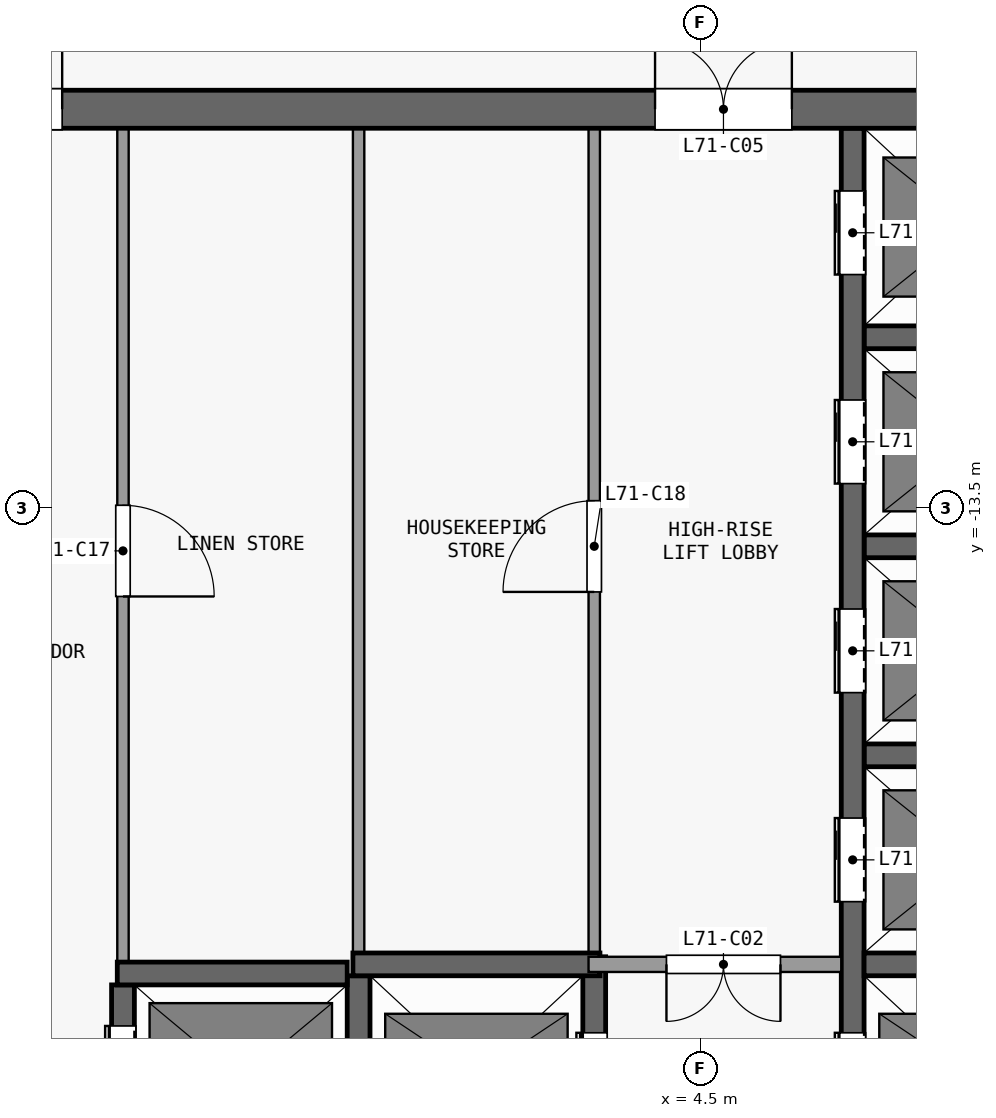
"""IFC4 building model, lengths in metres.
Left out: names, types, materials, properties, quantities, classifications, styles, units other than length and angle.
Written with IfcOpenShell. Run it as: python <this file> out.ifc"""

import sys

from ifc_helpers import new_model, si_unit, direction, frame, frame_2d, origin, place, context, subcontext, project, spatial, rectangle, extrude, element, fill, save


model = new_model("IFC4")
c1 = context("Model", 3, precision=1e-05, world=origin(), true_north=direction((0.0, 1.0)))
c2 = subcontext(c1, "Body", "Model", "MODEL_VIEW")
j1 = project(units=[si_unit("LENGTHUNIT", "METRE"), si_unit("PLANEANGLEUNIT", "RADIAN")], contexts=[c1])
p1 = place(None, origin())
s1 = spatial("IfcSite", under=j1, at=p1, CompositionType="ELEMENT")
p2 = place(p1, origin())
s2 = spatial("IfcBuilding", under=s1, at=p2, CompositionType="ELEMENT")
p3 = place(p2, frame((0.0, 0.0, 280.7)))
s3 = spatial("IfcBuildingStorey", under=s2, at=p3, CompositionType="ELEMENT", Elevation=280.7)
p4 = place(p3, frame((-13.1, -8.25, 0.0), z_axis=(0.0, 0.0, 1.0), x_axis=(1.0, 0.0, 0.0)))
e1 = element("IfcWall", 1, at=p4, inside=s3, PredefinedType="SHEAR", context=c2, shape_type="SweptSolid", body=[
    extrude(rectangle(XDim=26.2, YDim=0.5, at=frame_2d((13.1, 0.0))), origin(), (0.0, 0.0, 1.0), 3.3),
])
p5 = place(p4, frame((7.4, 0.0, 0.0)))
e2 = element("IfcOpeningElement", 2, at=p5, cuts=e1, PredefinedType="OPENING", context=c2, shape_type="SweptSolid", body=[
    extrude(rectangle(XDim=1.8, YDim=2.1, at=frame_2d((0.9, 1.05))), frame((0.0, 0.26, 0.0), z_axis=(0.0, -1.0, 0.0), x_axis=(1.0, 0.0, 0.0)), (0.0, 0.0, 1.0), 0.52),
])
p6 = place(p4, frame((17.0, 0.0, 0.0)))
e3 = element("IfcOpeningElement", 3, at=p6, cuts=e1, PredefinedType="OPENING", context=c2, shape_type="SweptSolid", body=[
    extrude(rectangle(XDim=1.8, YDim=2.1, at=frame_2d((0.9, 1.05))), frame((0.0, 0.26, 0.0), z_axis=(0.0, -1.0, 0.0), x_axis=(1.0, 0.0, 0.0)), (0.0, 0.0, 1.0), 0.52),
])
p7 = place(p4, frame((2.325, 0.0, 0.0)))
e4 = element("IfcOpeningElement", 4, at=p7, cuts=e1, PredefinedType="OPENING", context=c2, shape_type="SweptSolid", body=[
    extrude(rectangle(XDim=0.9, YDim=2.1, at=frame_2d((0.45, 1.05))), frame((0.0, 0.26, 0.0), z_axis=(0.0, -1.0, 0.0), x_axis=(1.0, 0.0, 0.0)), (0.0, 0.0, 1.0), 0.52),
])
p8 = place(p4, frame((22.975, 0.0, 0.0)))
e5 = element("IfcOpeningElement", 5, at=p8, cuts=e1, PredefinedType="OPENING", context=c2, shape_type="SweptSolid", body=[
    extrude(rectangle(XDim=0.9, YDim=2.1, at=frame_2d((0.45, 1.05))), frame((0.0, 0.26, 0.0), z_axis=(0.0, -1.0, 0.0), x_axis=(1.0, 0.0, 0.0)), (0.0, 0.0, 1.0), 0.52),
])
p9 = place(p3, frame((-3.175, -19.62, 0.0), z_axis=(0.0, 0.0, 1.0), x_axis=(1.0, 0.0, 0.0)))
e6 = element("IfcWall", 6, at=p9, inside=s3, PredefinedType="SHEAR", context=c2, shape_type="SweptSolid", body=[
    extrude(rectangle(XDim=3.025, YDim=0.3, at=frame_2d((1.513, 0.0))), origin(), (0.0, 0.0, 1.0), 3.3),
])
p10 = place(p3, frame((-0.075, -19.5, 0.0), z_axis=(0.0, 0.0, 1.0), x_axis=(1.0, 0.0, 0.0)))
e7 = element("IfcWall", 7, at=p10, inside=s3, PredefinedType="SHEAR", context=c2, shape_type="SweptSolid", body=[
    extrude(rectangle(XDim=3.25, YDim=0.3, at=frame_2d((1.625, 0.0))), origin(), (0.0, 0.0, 1.0), 3.3),
])
p11 = place(p3, frame((6.35, -19.5, 0.0), z_axis=(0.0, 0.0, 1.0), x_axis=(-1.0, 0.0, 0.0)))
e8 = element("IfcWall", 8, at=p11, inside=s3, PredefinedType="PARTITIONING", context=c2, shape_type="SweptSolid", body=[
    extrude(rectangle(XDim=3.325, YDim=0.2, at=frame_2d((1.663, 0.0))), origin(), (0.0, 0.0, 1.0), 3.3),
])
p12 = place(p11, frame((0.8, 0.0, 0.0)))
e9 = element("IfcOpeningElement", 9, at=p12, cuts=e8, PredefinedType="OPENING", context=c2, shape_type="SweptSolid", body=[
    extrude(rectangle(XDim=1.5, YDim=2.1, at=frame_2d((0.75, 1.05))), frame((0.0, 0.11, 0.0), z_axis=(0.0, -1.0, 0.0), x_axis=(1.0, 0.0, 0.0)), (0.0, 0.0, 1.0), 0.22),
])
for number, where, z_axis, x_axis in (
    (10, (6.65, -19.5, 0.0), (0.0, 0.0, 1.0), (1.0, 0.0, 0.0)),
    (11, (6.65, -16.75, 0.0), (0.0, 0.0, 1.0), (1.0, 0.0, 0.0)),
    (12, (6.65, -14.0, 0.0), (0.0, 0.0, 1.0), (1.0, 0.0, 0.0)),
    (13, (6.65, -11.25, 0.0), (0.0, 0.0, 1.0), (1.0, 0.0, 0.0)),
):
    element("IfcWall", number, at=place(p3, frame(where, z_axis=z_axis, x_axis=x_axis)), inside=s3, PredefinedType="SHEAR", context=c2, shape_type="SweptSolid", body=[
        extrude(rectangle(XDim=2.8, YDim=0.3, at=frame_2d((1.4, 0.0))), origin(), (0.0, 0.0, 1.0), 3.3),
    ])
p13 = place(p3, frame((-3.1, -22.25, 0.0), z_axis=(0.0, 0.0, 1.0), x_axis=(0.0, 1.0, 0.0)))
e14 = element("IfcWall", 14, at=p13, inside=s3, PredefinedType="SHEAR", context=c2, shape_type="SweptSolid", body=[
    extrude(rectangle(XDim=2.48, YDim=0.3, at=frame_2d((1.24, 0.0))), origin(), (0.0, 0.0, 1.0), 3.3),
])
p14 = place(p13, frame((0.54, 0.0, 0.0)))
e15 = element("IfcOpeningElement", 15, at=p14, cuts=e14, PredefinedType="OPENING", context=c2, shape_type="SweptSolid", body=[
    extrude(rectangle(XDim=1.4, YDim=2.1, at=frame_2d((0.7, 1.05))), frame((0.0, 0.16, 0.0), z_axis=(0.0, -1.0, 0.0), x_axis=(1.0, 0.0, 0.0)), (0.0, 0.0, 1.0), 0.32),
])
p15 = place(p3, frame((-3.1, -8.5, 0.0), z_axis=(0.0, 0.0, 1.0), x_axis=(0.0, -1.0, 0.0)))
e16 = element("IfcWall", 16, at=p15, inside=s3, PredefinedType="PARTITIONING", context=c2, shape_type="SweptSolid", body=[
    extrude(rectangle(XDim=10.97, YDim=0.15, at=frame_2d((5.485, 0.0))), origin(), (0.0, 0.0, 1.0), 3.3),
])
p16 = place(p15, frame((4.96, 0.0, 0.0)))
e17 = element("IfcOpeningElement", 17, at=p16, cuts=e16, PredefinedType="OPENING", context=c2, shape_type="SweptSolid", body=[
    extrude(rectangle(XDim=1.2, YDim=2.1, at=frame_2d((0.6, 1.05))), frame((0.0, 0.085, 0.0), z_axis=(0.0, -1.0, 0.0), x_axis=(1.0, 0.0, 0.0)), (0.0, 0.0, 1.0), 0.17),
])
p17 = place(p3, frame((0.0, -22.25, 0.0), z_axis=(0.0, 0.0, 1.0), x_axis=(0.0, 1.0, 0.0)))
e18 = element("IfcWall", 18, at=p17, inside=s3, PredefinedType="SHEAR", context=c2, shape_type="SweptSolid", body=[
    extrude(rectangle(XDim=2.6, YDim=0.3, at=frame_2d((1.3, 0.0))), origin(), (0.0, 0.0, 1.0), 3.3),
])
p18 = place(p3, frame((0.0, -19.35, 0.0), z_axis=(0.0, 0.0, 1.0), x_axis=(0.0, 1.0, 0.0)))
e19 = element("IfcWall", 19, at=p18, inside=s3, PredefinedType="PARTITIONING", context=c2, shape_type="SweptSolid", body=[
    extrude(rectangle(XDim=10.85, YDim=0.15, at=frame_2d((5.425, 0.0))), origin(), (0.0, 0.0, 1.0), 3.3),
])
p19 = place(p3, frame((3.1, -22.25, 0.0), z_axis=(0.0, 0.0, 1.0), x_axis=(0.0, 1.0, 0.0)))
e20 = element("IfcWall", 20, at=p19, inside=s3, PredefinedType="SHEAR", context=c2, shape_type="SweptSolid", body=[
    extrude(rectangle(XDim=2.85, YDim=0.3, at=frame_2d((1.425, 0.0))), origin(), (0.0, 0.0, 1.0), 3.3),
])
p20 = place(p19, frame((0.75, 0.0, 0.0)))
e21 = element("IfcOpeningElement", 21, at=p20, cuts=e20, PredefinedType="OPENING", context=c2, shape_type="SweptSolid", body=[
    extrude(rectangle(XDim=1.1, YDim=2.1, at=frame_2d((0.55, 1.05))), frame((0.0, 0.16, 0.0), z_axis=(0.0, -1.0, 0.0), x_axis=(1.0, 0.0, 0.0)), (0.0, 0.0, 1.0), 0.32),
])
p21 = place(p3, frame((3.1, -19.4, 0.0), z_axis=(0.0, 0.0, 1.0), x_axis=(0.0, 1.0, 0.0)))
e22 = element("IfcWall", 22, at=p21, inside=s3, PredefinedType="PARTITIONING", context=c2, shape_type="SweptSolid", body=[
    extrude(rectangle(XDim=10.9, YDim=0.15, at=frame_2d((5.45, 0.0))), origin(), (0.0, 0.0, 1.0), 3.3),
])
p22 = place(p21, frame((4.8, 0.0, 0.0)))
e23 = element("IfcOpeningElement", 23, at=p22, cuts=e22, PredefinedType="OPENING", context=c2, shape_type="SweptSolid", body=[
    extrude(rectangle(XDim=1.2, YDim=2.1, at=frame_2d((0.6, 1.05))), frame((0.0, 0.085, 0.0), z_axis=(0.0, -1.0, 0.0), x_axis=(1.0, 0.0, 0.0)), (0.0, 0.0, 1.0), 0.17),
])
p23 = place(p3, frame((6.5, -22.55, 0.0), z_axis=(0.0, 0.0, 1.0), x_axis=(0.0, 1.0, 0.0)))
e24 = element("IfcWall", 24, at=p23, inside=s3, PredefinedType="SHEAR", context=c2, shape_type="SweptSolid", body=[
    extrude(rectangle(XDim=14.05, YDim=0.3, at=frame_2d((7.025, 0.0))), origin(), (0.0, 0.0, 1.0), 3.3),
])
p24 = place(p23, frame((1.05, 0.0, 0.0)))
e25 = element("IfcOpeningElement", 25, at=p24, cuts=e24, PredefinedType="OPENING", context=c2, shape_type="SweptSolid", body=[
    extrude(rectangle(XDim=1.1, YDim=2.1, at=frame_2d((0.55, 1.05))), frame((0.0, 0.16, 0.0), z_axis=(0.0, -1.0, 0.0), x_axis=(1.0, 0.0, 0.0)), (0.0, 0.0, 1.0), 0.32),
])
p25 = place(p23, frame((3.875, 0.0, 0.0)))
e26 = element("IfcOpeningElement", 26, at=p25, cuts=e24, PredefinedType="OPENING", context=c2, shape_type="SweptSolid", body=[
    extrude(rectangle(XDim=1.1, YDim=2.1, at=frame_2d((0.55, 1.05))), frame((0.0, 0.16, 0.0), z_axis=(0.0, -1.0, 0.0), x_axis=(1.0, 0.0, 0.0)), (0.0, 0.0, 1.0), 0.32),
])
p26 = place(p23, frame((6.625, 0.0, 0.0)))
e27 = element("IfcOpeningElement", 27, at=p26, cuts=e24, PredefinedType="OPENING", context=c2, shape_type="SweptSolid", body=[
    extrude(rectangle(XDim=1.1, YDim=2.1, at=frame_2d((0.55, 1.05))), frame((0.0, 0.16, 0.0), z_axis=(0.0, -1.0, 0.0), x_axis=(1.0, 0.0, 0.0)), (0.0, 0.0, 1.0), 0.32),
])
p27 = place(p23, frame((9.375, 0.0, 0.0)))
e28 = element("IfcOpeningElement", 28, at=p27, cuts=e24, PredefinedType="OPENING", context=c2, shape_type="SweptSolid", body=[
    extrude(rectangle(XDim=1.1, YDim=2.1, at=frame_2d((0.55, 1.05))), frame((0.0, 0.16, 0.0), z_axis=(0.0, -1.0, 0.0), x_axis=(1.0, 0.0, 0.0)), (0.0, 0.0, 1.0), 0.32),
])
p28 = place(p23, frame((12.125, 0.0, 0.0)))
e29 = element("IfcOpeningElement", 29, at=p28, cuts=e24, PredefinedType="OPENING", context=c2, shape_type="SweptSolid", body=[
    extrude(rectangle(XDim=1.1, YDim=2.1, at=frame_2d((0.55, 1.05))), frame((0.0, 0.16, 0.0), z_axis=(0.0, -1.0, 0.0), x_axis=(1.0, 0.0, 0.0)), (0.0, 0.0, 1.0), 0.32),
])
p29 = place(p20, origin())
e30 = element("IfcDoor", 30, at=p29, inside=s3, OperationType="DOUBLE_DOOR_SLIDING", PredefinedType="DOOR", context=c2, shape_type="SweptSolid", body=[
    extrude(rectangle(XDim=1.1, YDim=2.1, at=frame_2d((0.55, 1.05))), frame((0.0, 0.025, 0.0), z_axis=(0.0, -1.0, 0.0), x_axis=(1.0, 0.0, 0.0)), (0.0, 0.0, 1.0), 0.05),
])
fill(e21, e30)
p30 = place(p24, origin())
e31 = element("IfcDoor", 31, at=p30, inside=s3, OperationType="DOUBLE_DOOR_SLIDING", PredefinedType="DOOR", context=c2, shape_type="SweptSolid", body=[
    extrude(rectangle(XDim=1.1, YDim=2.1, at=frame_2d((0.55, 1.05))), frame((0.0, 0.025, 0.0), z_axis=(0.0, -1.0, 0.0), x_axis=(1.0, 0.0, 0.0)), (0.0, 0.0, 1.0), 0.05),
])
fill(e25, e31)
p31 = place(p25, origin())
e32 = element("IfcDoor", 32, at=p31, inside=s3, OperationType="DOUBLE_DOOR_SLIDING", PredefinedType="DOOR", context=c2, shape_type="SweptSolid", body=[
    extrude(rectangle(XDim=1.1, YDim=2.1, at=frame_2d((0.55, 1.05))), frame((0.0, 0.025, 0.0), z_axis=(0.0, -1.0, 0.0), x_axis=(1.0, 0.0, 0.0)), (0.0, 0.0, 1.0), 0.05),
])
fill(e26, e32)
p32 = place(p26, origin())
e33 = element("IfcDoor", 33, at=p32, inside=s3, OperationType="DOUBLE_DOOR_SLIDING", PredefinedType="DOOR", context=c2, shape_type="SweptSolid", body=[
    extrude(rectangle(XDim=1.1, YDim=2.1, at=frame_2d((0.55, 1.05))), frame((0.0, 0.025, 0.0), z_axis=(0.0, -1.0, 0.0), x_axis=(1.0, 0.0, 0.0)), (0.0, 0.0, 1.0), 0.05),
])
fill(e27, e33)
p33 = place(p27, origin())
e34 = element("IfcDoor", 34, at=p33, inside=s3, OperationType="DOUBLE_DOOR_SLIDING", PredefinedType="DOOR", context=c2, shape_type="SweptSolid", body=[
    extrude(rectangle(XDim=1.1, YDim=2.1, at=frame_2d((0.55, 1.05))), frame((0.0, 0.025, 0.0), z_axis=(0.0, -1.0, 0.0), x_axis=(1.0, 0.0, 0.0)), (0.0, 0.0, 1.0), 0.05),
])
fill(e28, e34)
p34 = place(p28, origin())
e35 = element("IfcDoor", 35, at=p34, inside=s3, OperationType="DOUBLE_DOOR_SLIDING", PredefinedType="DOOR", context=c2, shape_type="SweptSolid", body=[
    extrude(rectangle(XDim=1.1, YDim=2.1, at=frame_2d((0.55, 1.05))), frame((0.0, 0.025, 0.0), z_axis=(0.0, -1.0, 0.0), x_axis=(1.0, 0.0, 0.0)), (0.0, 0.0, 1.0), 0.05),
])
fill(e29, e35)
p35 = place(p14, origin())
e36 = element("IfcDoor", 36, at=p35, inside=s3, OperationType="DOUBLE_DOOR_SLIDING", PredefinedType="DOOR", context=c2, shape_type="SweptSolid", body=[
    extrude(rectangle(XDim=1.4, YDim=2.1, at=frame_2d((0.7, 1.05))), frame((0.0, 0.025, 0.0), z_axis=(0.0, -1.0, 0.0), x_axis=(1.0, 0.0, 0.0)), (0.0, 0.0, 1.0), 0.05),
])
fill(e15, e36)
p36 = place(p12, origin())
e37 = element("IfcDoor", 37, at=p36, inside=s3, OperationType="DOUBLE_DOOR_SINGLE_SWING", PredefinedType="DOOR", context=c2, shape_type="SweptSolid", body=[
    extrude(rectangle(XDim=1.5, YDim=2.1, at=frame_2d((0.75, 1.05))), frame((0.0, 0.025, 0.0), z_axis=(0.0, -1.0, 0.0), x_axis=(1.0, 0.0, 0.0)), (0.0, 0.0, 1.0), 0.05),
])
fill(e9, e37)
p37 = place(p5, origin())
e38 = element("IfcDoor", 38, at=p37, inside=s3, OperationType="DOUBLE_DOOR_SINGLE_SWING", PredefinedType="DOOR", context=c2, shape_type="SweptSolid", body=[
    extrude(rectangle(XDim=1.8, YDim=2.1, at=frame_2d((0.9, 1.05))), frame((0.0, 0.025, 0.0), z_axis=(0.0, -1.0, 0.0), x_axis=(1.0, 0.0, 0.0)), (0.0, 0.0, 1.0), 0.05),
])
fill(e2, e38)
p38 = place(p6, origin())
e39 = element("IfcDoor", 39, at=p38, inside=s3, OperationType="DOUBLE_DOOR_SINGLE_SWING", PredefinedType="DOOR", context=c2, shape_type="SweptSolid", body=[
    extrude(rectangle(XDim=1.8, YDim=2.1, at=frame_2d((0.9, 1.05))), frame((0.0, 0.025, 0.0), z_axis=(0.0, -1.0, 0.0), x_axis=(1.0, 0.0, 0.0)), (0.0, 0.0, 1.0), 0.05),
])
fill(e3, e39)
p39 = place(p16, origin())
e40 = element("IfcDoor", 40, at=p39, inside=s3, OperationType="SINGLE_SWING_RIGHT", PredefinedType="DOOR", context=c2, shape_type="SweptSolid", body=[
    extrude(rectangle(XDim=1.2, YDim=2.1, at=frame_2d((0.6, 1.05))), frame((0.0, 0.025, 0.0), z_axis=(0.0, -1.0, 0.0), x_axis=(1.0, 0.0, 0.0)), (0.0, 0.0, 1.0), 0.05),
])
fill(e17, e40)
p40 = place(p22, origin())
e41 = element("IfcDoor", 41, at=p40, inside=s3, OperationType="SINGLE_SWING_LEFT", PredefinedType="DOOR", context=c2, shape_type="SweptSolid", body=[
    extrude(rectangle(XDim=1.2, YDim=2.1, at=frame_2d((0.6, 1.05))), frame((0.0, 0.025, 0.0), z_axis=(0.0, -1.0, 0.0), x_axis=(1.0, 0.0, 0.0)), (0.0, 0.0, 1.0), 0.05),
])
fill(e23, e41)
save(model, sys.argv[1])
